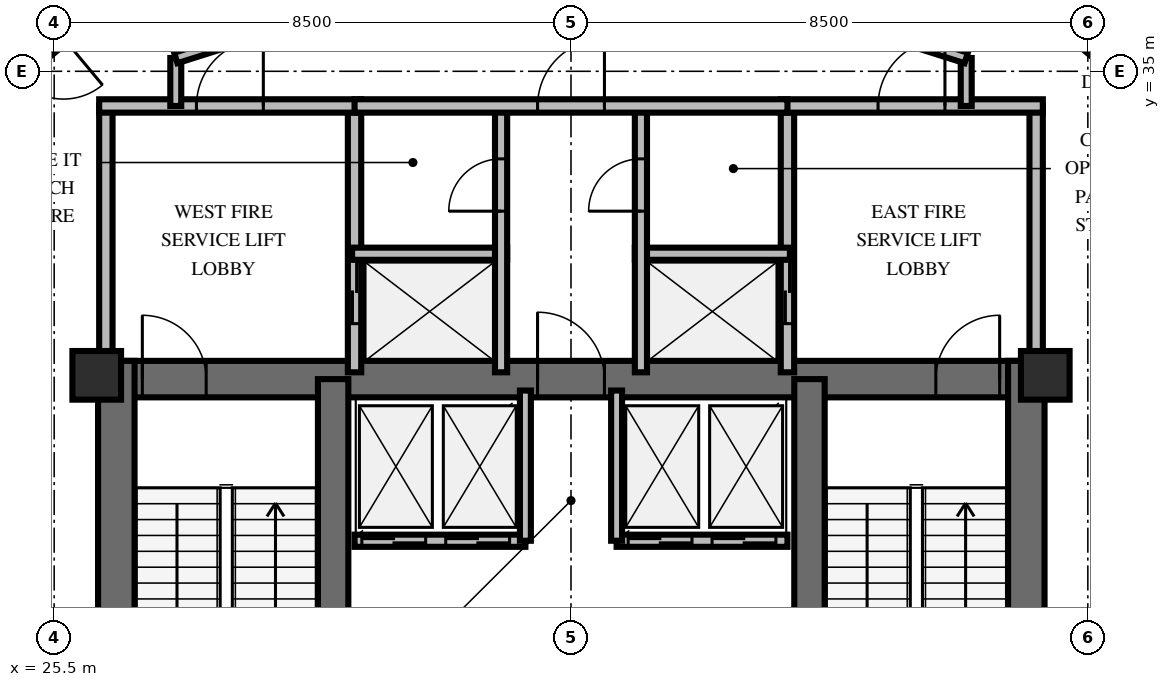
"""IFC4 building model, lengths in metres.
Left out: names, types, materials, properties, quantities, classifications, styles, units other than length and angle.
Written with IfcOpenShell. Run it as: python <this file> out.ifc"""

import sys

from ifc_helpers import new_model, si_unit, direction, frame, frame_2d, origin, origin_2d, place, context, subcontext, project, spatial, rectangle, extrude, element, fill, save


model = new_model("IFC4")
c1 = context("Model", 3, precision=1e-05, world=origin(), true_north=direction((0.0, 1.0)))
c2 = subcontext(c1, "Body", "Model", "MODEL_VIEW")
j1 = project(units=[si_unit("LENGTHUNIT", "METRE"), si_unit("PLANEANGLEUNIT", "RADIAN")], contexts=[c1])
p1 = place(None, origin())
s1 = spatial("IfcSite", under=j1, at=p1, CompositionType="ELEMENT")
p2 = place(p1, origin())
s2 = spatial("IfcBuilding", under=s1, at=p2, CompositionType="ELEMENT")
p3 = place(p2, frame((0.0, 0.0, 277.2)))
s3 = spatial("IfcBuildingStorey", under=s2, at=p3, CompositionType="ELEMENT", Elevation=277.2)
p4 = place(p3, frame((26.222, 29.938, 0.0), z_axis=(0.0, 0.0, 1.0), x_axis=(1.0, 0.0, 0.0)))
e1 = element("IfcWall", 1, at=p4, inside=s3, PredefinedType="SHEAR", context=c2, shape_type="SweptSolid", body=[
    extrude(rectangle(XDim=15.566, YDim=0.6, at=frame_2d((7.783, 0.0))), origin(), (0.0, 0.0, 1.0), 3.6),
])
p5 = place(p4, frame((0.728, 0.0, 0.0)))
e2 = element("IfcOpeningElement", 2, at=p5, cuts=e1, PredefinedType="OPENING", context=c2, shape_type="SweptSolid", body=[
    extrude(rectangle(XDim=1.05, YDim=2.15, at=frame_2d((0.525, 1.075))), frame((0.0, 0.31, 0.0), z_axis=(0.0, -1.0, 0.0), x_axis=(1.0, 0.0, 0.0)), (0.0, 0.0, 1.0), 0.62),
])
p6 = place(p4, frame((13.778, 0.0, 0.0)))
e3 = element("IfcOpeningElement", 3, at=p6, cuts=e1, PredefinedType="OPENING", context=c2, shape_type="SweptSolid", body=[
    extrude(rectangle(XDim=1.05, YDim=2.15, at=frame_2d((0.525, 1.075))), frame((0.0, 0.31, 0.0), z_axis=(0.0, -1.0, 0.0), x_axis=(1.0, 0.0, 0.0)), (0.0, 0.0, 1.0), 0.62),
])
p7 = place(p4, frame((7.228, 0.0, 0.0)))
e4 = element("IfcOpeningElement", 4, at=p7, cuts=e1, PredefinedType="OPENING", context=c2, shape_type="SweptSolid", body=[
    extrude(rectangle(XDim=1.1, YDim=2.15, at=frame_2d((0.55, 1.075))), frame((0.0, 0.31, 0.0), z_axis=(0.0, -1.0, 0.0), x_axis=(1.0, 0.0, 0.0)), (0.0, 0.0, 1.0), 0.62),
])
for number, where, z_axis, x_axis in (
    (5, (26.522, 19.962, 0.0), (0.0, 0.0, 1.0), (0.0, 1.0, 0.0)),
    (6, (41.488, 19.962, 0.0), (0.0, 0.0, 1.0), (0.0, 1.0, 0.0)),
):
    element("IfcWall", number, at=place(p3, frame(where, z_axis=z_axis, x_axis=x_axis)), inside=s3, PredefinedType="SHEAR", context=c2, shape_type="SweptSolid", body=[
        extrude(rectangle(XDim=10.276, YDim=0.6, at=frame_2d((5.138, 0.0))), origin(), (0.0, 0.0, 1.0), 3.6),
    ])
for number, where, z_axis, x_axis in (
    (7, (30.088, 20.262, 0.0), (0.0, 0.0, 1.0), (0.0, 1.0, 0.0)),
    (8, (37.922, 20.262, 0.0), (0.0, 0.0, 1.0), (0.0, 1.0, 0.0)),
):
    element("IfcWall", number, at=place(p3, frame(where, z_axis=z_axis, x_axis=x_axis)), inside=s3, PredefinedType="SHEAR", context=c2, shape_type="SweptSolid", body=[
        extrude(rectangle(XDim=9.676, YDim=0.5, at=frame_2d((4.838, 0.0))), origin(), (0.0, 0.0, 1.0), 3.6),
    ])
for number, where, z_axis, x_axis in (
    (9, (26.2, 30.0, 0.0), (0.0, 0.0, 1.0), (1.0, 0.0, 0.0)),
    (10, (41.8, 30.0, 0.0), (0.0, 0.0, 1.0), (1.0, 0.0, 0.0)),
):
    element("IfcColumn", number, at=place(p3, frame(where, z_axis=z_axis, x_axis=x_axis)), inside=s3, PredefinedType="PILASTER", context=c2, shape_type="SweptSolid", body=[
        extrude(rectangle(XDim=0.8, YDim=0.8, at=origin_2d()), origin(), (0.0, 0.0, 1.0), 3.6),
    ])
p8 = place(p3, frame((26.35, 30.05, 0.0), z_axis=(0.0, 0.0, 1.0), x_axis=(0.0, 1.0, 0.0)))
e11 = element("IfcWall", 11, at=p8, inside=s3, PredefinedType="SOLIDWALL", context=c2, shape_type="SweptSolid", body=[
    extrude(rectangle(XDim=4.38, YDim=0.22, at=frame_2d((2.19, 0.0))), origin(), (0.0, 0.0, 1.0), 2.46),
])
p9 = place(p3, frame((30.44, 30.05, 0.0), z_axis=(0.0, 0.0, 1.0), x_axis=(0.0, 1.0, 0.0)))
e12 = element("IfcWall", 12, at=p9, inside=s3, PredefinedType="SOLIDWALL", context=c2, shape_type="SweptSolid", body=[
    extrude(rectangle(XDim=4.38, YDim=0.22, at=frame_2d((2.19, 0.0))), origin(), (0.0, 0.0, 1.0), 2.46),
])
p10 = place(p9, frame((0.8, 0.0, 0.0)))
e13 = element("IfcOpeningElement", 13, at=p10, cuts=e12, PredefinedType="OPENING", context=c2, shape_type="SweptSolid", body=[
    extrude(rectangle(XDim=1.05, YDim=2.1, at=frame_2d((0.525, 1.05))), frame((0.0, 0.12, 0.0), z_axis=(0.0, -1.0, 0.0), x_axis=(1.0, 0.0, 0.0)), (0.0, 0.0, 1.0), 0.24),
])
p11 = place(p3, frame((26.24, 34.43, 0.0), z_axis=(0.0, 0.0, 1.0), x_axis=(1.0, 0.0, 0.0)))
e14 = element("IfcWall", 14, at=p11, inside=s3, PredefinedType="SOLIDWALL", context=c2, shape_type="SweptSolid", body=[
    extrude(rectangle(XDim=4.31, YDim=0.22, at=frame_2d((2.155, 0.0))), origin(), (0.0, 0.0, 1.0), 2.46),
])
p12 = place(p11, frame((1.6, 0.0, 0.0)))
e15 = element("IfcOpeningElement", 15, at=p12, cuts=e14, PredefinedType="OPENING", context=c2, shape_type="SweptSolid", body=[
    extrude(rectangle(XDim=1.1, YDim=2.15, at=frame_2d((0.55, 1.075))), frame((0.0, 0.12, 0.0), z_axis=(0.0, -1.0, 0.0), x_axis=(1.0, 0.0, 0.0)), (0.0, 0.0, 1.0), 0.24),
])
p13 = place(p3, frame((30.4, 32.0, 0.0), z_axis=(0.0, 0.0, 1.0), x_axis=(1.0, 0.0, 0.0)))
e16 = element("IfcWall", 16, at=p13, inside=s3, PredefinedType="SOLIDWALL", context=c2, shape_type="SweptSolid", body=[
    extrude(rectangle(XDim=2.55, YDim=0.2, at=frame_2d((1.275, 0.0))), origin(), (0.0, 0.0, 1.0), 2.46),
])
p14 = place(p3, frame((32.85, 30.05, 0.0), z_axis=(0.0, 0.0, 1.0), x_axis=(0.0, 1.0, 0.0)))
e17 = element("IfcWall", 17, at=p14, inside=s3, PredefinedType="SOLIDWALL", context=c2, shape_type="SweptSolid", body=[
    extrude(rectangle(XDim=4.38, YDim=0.2, at=frame_2d((2.19, 0.0))), origin(), (0.0, 0.0, 1.0), 2.46),
])
p15 = place(p14, frame((2.65, 0.0, 0.0)))
e18 = element("IfcOpeningElement", 18, at=p15, cuts=e17, PredefinedType="OPENING", context=c2, shape_type="SweptSolid", body=[
    extrude(rectangle(XDim=0.86, YDim=2.05, at=frame_2d((0.43, 1.025))), frame((0.0, 0.11, 0.0), z_axis=(0.0, -1.0, 0.0), x_axis=(1.0, 0.0, 0.0)), (0.0, 0.0, 1.0), 0.22),
])
p16 = place(p3, frame((37.56, 30.05, 0.0), z_axis=(0.0, 0.0, 1.0), x_axis=(0.0, 1.0, 0.0)))
e19 = element("IfcWall", 19, at=p16, inside=s3, PredefinedType="SOLIDWALL", context=c2, shape_type="SweptSolid", body=[
    extrude(rectangle(XDim=4.38, YDim=0.22, at=frame_2d((2.19, 0.0))), origin(), (0.0, 0.0, 1.0), 2.46),
])
p17 = place(p16, frame((0.8, 0.0, 0.0)))
e20 = element("IfcOpeningElement", 20, at=p17, cuts=e19, PredefinedType="OPENING", context=c2, shape_type="SweptSolid", body=[
    extrude(rectangle(XDim=1.05, YDim=2.1, at=frame_2d((0.525, 1.05))), frame((0.0, 0.12, 0.0), z_axis=(0.0, -1.0, 0.0), x_axis=(1.0, 0.0, 0.0)), (0.0, 0.0, 1.0), 0.24),
])
p18 = place(p3, frame((41.65, 30.05, 0.0), z_axis=(0.0, 0.0, 1.0), x_axis=(0.0, 1.0, 0.0)))
e21 = element("IfcWall", 21, at=p18, inside=s3, PredefinedType="SOLIDWALL", context=c2, shape_type="SweptSolid", body=[
    extrude(rectangle(XDim=4.38, YDim=0.22, at=frame_2d((2.19, 0.0))), origin(), (0.0, 0.0, 1.0), 2.46),
])
p19 = place(p3, frame((37.45, 34.43, 0.0), z_axis=(0.0, 0.0, 1.0), x_axis=(1.0, 0.0, 0.0)))
e22 = element("IfcWall", 22, at=p19, inside=s3, PredefinedType="SOLIDWALL", context=c2, shape_type="SweptSolid", body=[
    extrude(rectangle(XDim=4.31, YDim=0.22, at=frame_2d((2.155, 0.0))), origin(), (0.0, 0.0, 1.0), 2.46),
])
p20 = place(p19, frame((1.6, 0.0, 0.0)))
e23 = element("IfcOpeningElement", 23, at=p20, cuts=e22, PredefinedType="OPENING", context=c2, shape_type="SweptSolid", body=[
    extrude(rectangle(XDim=1.1, YDim=2.15, at=frame_2d((0.55, 1.075))), frame((0.0, 0.12, 0.0), z_axis=(0.0, -1.0, 0.0), x_axis=(1.0, 0.0, 0.0)), (0.0, 0.0, 1.0), 0.24),
])
p21 = place(p3, frame((35.05, 32.0, 0.0), z_axis=(0.0, 0.0, 1.0), x_axis=(1.0, 0.0, 0.0)))
e24 = element("IfcWall", 24, at=p21, inside=s3, PredefinedType="SOLIDWALL", context=c2, shape_type="SweptSolid", body=[
    extrude(rectangle(XDim=2.55, YDim=0.2, at=frame_2d((1.275, 0.0))), origin(), (0.0, 0.0, 1.0), 2.46),
])
p22 = place(p3, frame((35.15, 30.05, 0.0), z_axis=(0.0, 0.0, 1.0), x_axis=(0.0, 1.0, 0.0)))
e25 = element("IfcWall", 25, at=p22, inside=s3, PredefinedType="SOLIDWALL", context=c2, shape_type="SweptSolid", body=[
    extrude(rectangle(XDim=4.38, YDim=0.2, at=frame_2d((2.19, 0.0))), origin(), (0.0, 0.0, 1.0), 2.46),
])
p23 = place(p22, frame((2.65, 0.0, 0.0)))
e26 = element("IfcOpeningElement", 26, at=p23, cuts=e25, PredefinedType="OPENING", context=c2, shape_type="SweptSolid", body=[
    extrude(rectangle(XDim=0.86, YDim=2.05, at=frame_2d((0.43, 1.025))), frame((0.0, 0.11, 0.0), z_axis=(0.0, -1.0, 0.0), x_axis=(1.0, 0.0, 0.0)), (0.0, 0.0, 1.0), 0.22),
])
p24 = place(p3, frame((30.44, 34.43, 0.0), z_axis=(0.0, 0.0, 1.0), x_axis=(1.0, 0.0, 0.0)))
e27 = element("IfcWall", 27, at=p24, inside=s3, PredefinedType="SOLIDWALL", context=c2, shape_type="SweptSolid", body=[
    extrude(rectangle(XDim=7.12, YDim=0.22, at=frame_2d((3.56, 0.0))), origin(), (0.0, 0.0, 1.0), 2.46),
])
p25 = place(p24, frame((3.01, 0.0, 0.0)))
e28 = element("IfcOpeningElement", 28, at=p25, cuts=e27, PredefinedType="OPENING", context=c2, shape_type="SweptSolid", body=[
    extrude(rectangle(XDim=1.1, YDim=2.15, at=frame_2d((0.55, 1.075))), frame((0.0, 0.12, 0.0), z_axis=(0.0, -1.0, 0.0), x_axis=(1.0, 0.0, 0.0)), (0.0, 0.0, 1.0), 0.24),
])
p26 = place(p3, frame((30.44, 27.28, 0.0), z_axis=(0.0, 0.0, 1.0), x_axis=(1.0, 0.0, 0.0)))
e29 = element("IfcWall", 29, at=p26, inside=s3, PredefinedType="SOLIDWALL", context=c2, shape_type="SweptSolid", body=[
    extrude(rectangle(XDim=2.81, YDim=0.2, at=frame_2d((1.405, 0.0))), origin(), (0.0, 0.0, 1.0), 2.46),
])
p27 = place(p26, frame((0.12, 0.0, 0.0)))
e30 = element("IfcOpeningElement", 30, at=p27, cuts=e29, PredefinedType="OPENING", context=c2, shape_type="SweptSolid", body=[
    extrude(rectangle(XDim=1.05, YDim=2.1, at=frame_2d((0.525, 1.05))), frame((0.0, 0.11, 0.0), z_axis=(0.0, -1.0, 0.0), x_axis=(1.0, 0.0, 0.0)), (0.0, 0.0, 1.0), 0.22),
])
p28 = place(p26, frame((1.5, 0.0, 0.0)))
e31 = element("IfcOpeningElement", 31, at=p28, cuts=e29, PredefinedType="OPENING", context=c2, shape_type="SweptSolid", body=[
    extrude(rectangle(XDim=1.05, YDim=2.1, at=frame_2d((0.525, 1.05))), frame((0.0, 0.11, 0.0), z_axis=(0.0, -1.0, 0.0), x_axis=(1.0, 0.0, 0.0)), (0.0, 0.0, 1.0), 0.22),
])
p29 = place(p3, frame((33.25, 27.28, 0.0), z_axis=(0.0, 0.0, 1.0), x_axis=(0.0, 1.0, 0.0)))
e32 = element("IfcWall", 32, at=p29, inside=s3, PredefinedType="SOLIDWALL", context=c2, shape_type="SweptSolid", body=[
    extrude(rectangle(XDim=2.47, YDim=0.18, at=frame_2d((1.235, 0.0))), origin(), (0.0, 0.0, 1.0), 2.46),
])
p30 = place(p3, frame((34.75, 27.28, 0.0), z_axis=(0.0, 0.0, 1.0), x_axis=(1.0, 0.0, 0.0)))
e33 = element("IfcWall", 33, at=p30, inside=s3, PredefinedType="SOLIDWALL", context=c2, shape_type="SweptSolid", body=[
    extrude(rectangle(XDim=2.81, YDim=0.2, at=frame_2d((1.405, 0.0))), origin(), (0.0, 0.0, 1.0), 2.46),
])
p31 = place(p30, frame((0.19, 0.0, 0.0)))
e34 = element("IfcOpeningElement", 34, at=p31, cuts=e33, PredefinedType="OPENING", context=c2, shape_type="SweptSolid", body=[
    extrude(rectangle(XDim=1.05, YDim=2.1, at=frame_2d((0.525, 1.05))), frame((0.0, 0.11, 0.0), z_axis=(0.0, -1.0, 0.0), x_axis=(1.0, 0.0, 0.0)), (0.0, 0.0, 1.0), 0.22),
])
p32 = place(p30, frame((1.57, 0.0, 0.0)))
e35 = element("IfcOpeningElement", 35, at=p32, cuts=e33, PredefinedType="OPENING", context=c2, shape_type="SweptSolid", body=[
    extrude(rectangle(XDim=1.05, YDim=2.1, at=frame_2d((0.525, 1.05))), frame((0.0, 0.11, 0.0), z_axis=(0.0, -1.0, 0.0), x_axis=(1.0, 0.0, 0.0)), (0.0, 0.0, 1.0), 0.22),
])
p33 = place(p3, frame((34.75, 27.28, 0.0), z_axis=(0.0, 0.0, 1.0), x_axis=(0.0, 1.0, 0.0)))
e36 = element("IfcWall", 36, at=p33, inside=s3, PredefinedType="SOLIDWALL", context=c2, shape_type="SweptSolid", body=[
    extrude(rectangle(XDim=2.47, YDim=0.18, at=frame_2d((1.235, 0.0))), origin(), (0.0, 0.0, 1.0), 2.46),
])
for number, where, z_axis, x_axis in (
    (37, (27.5, 34.43, 0.0), (0.0, 0.0, 1.0), (0.0, 1.0, 0.0)),
    (38, (40.5, 35.219, 0.0), (0.0, 0.0, 1.0), (0.0, -1.0, 0.0)),
):
    element("IfcWall", number, at=place(p3, frame(where, z_axis=z_axis, x_axis=x_axis)), inside=s3, PredefinedType="PARTITIONING", context=c2, shape_type="SweptSolid", body=[
        extrude(rectangle(XDim=0.789, YDim=0.18, at=frame_2d((0.395, 0.0))), origin(), (0.0, 0.0, 1.0), 2.46),
    ])
p34 = place(p3, frame((27.5, 35.219, 0.0), z_axis=(0.0, 0.0, 1.0), x_axis=(0.953228121756, 0.302251795518, 0.0)))
e39 = element("IfcWall", 39, at=p34, inside=s3, PredefinedType="PARTITIONING", context=c2, shape_type="SweptSolid", body=[
    extrude(rectangle(XDim=6.819, YDim=0.18, at=frame_2d((3.409, 0.0))), origin(), (0.0, 0.0, 1.0), 2.46),
])
p35 = place(p34, frame((2.86, 0.0, 0.0)))
e40 = element("IfcOpeningElement", 40, at=p35, cuts=e39, PredefinedType="OPENING", context=c2, shape_type="SweptSolid", body=[
    extrude(rectangle(XDim=1.1, YDim=2.15, at=frame_2d((0.55, 1.075))), frame((0.0, 0.1, 0.0), z_axis=(0.0, -1.0, 0.0), x_axis=(1.0, 0.0, 0.0)), (0.0, 0.0, 1.0), 0.2),
])
p36 = place(p3, frame((34.0, 37.28, 0.0), z_axis=(0.0, 0.0, 1.0), x_axis=(0.953228121756, -0.302251795518, 0.0)))
e41 = element("IfcWall", 41, at=p36, inside=s3, PredefinedType="PARTITIONING", context=c2, shape_type="SweptSolid", body=[
    extrude(rectangle(XDim=6.819, YDim=0.18, at=frame_2d((3.409, 0.0))), origin(), (0.0, 0.0, 1.0), 2.46),
])
p37 = place(p36, frame((2.86, 0.0, 0.0)))
e42 = element("IfcOpeningElement", 42, at=p37, cuts=e41, PredefinedType="OPENING", context=c2, shape_type="SweptSolid", body=[
    extrude(rectangle(XDim=1.1, YDim=2.15, at=frame_2d((0.55, 1.075))), frame((0.0, 0.1, 0.0), z_axis=(0.0, -1.0, 0.0), x_axis=(1.0, 0.0, 0.0)), (0.0, 0.0, 1.0), 0.2),
])
p38 = place(p3, frame((43.881, 34.247, 0.0), z_axis=(0.0, 0.0, 1.0), x_axis=(-0.764357098744, 0.644793164976, 0.0)))
e43 = element("IfcWall", 43, at=p38, inside=s3, PredefinedType="PARTITIONING", context=c2, shape_type="SweptSolid", body=[
    extrude(rectangle(XDim=4.47, YDim=0.18, at=frame_2d((2.235, 0.0))), origin(), (0.0, 0.0, 1.0), 2.46),
])
p39 = place(p3, frame((45.186, 35.336, 0.0), z_axis=(0.0, 0.0, 1.0), x_axis=(-0.764355389284, 0.644795191415, 0.0)))
e44 = element("IfcWall", 44, at=p39, inside=s3, PredefinedType="PARTITIONING", context=c2, shape_type="SweptSolid", body=[
    extrude(rectangle(XDim=5.06, YDim=0.15, at=frame_2d((2.53, 0.0))), origin(), (0.0, 0.0, 1.0), 2.46),
])
p40 = place(p39, frame((1.117, 0.0, 0.0)))
e45 = element("IfcOpeningElement", 45, at=p40, cuts=e44, PredefinedType="OPENING", context=c2, shape_type="SweptSolid", body=[
    extrude(rectangle(XDim=0.95, YDim=2.15, at=frame_2d((0.475, 1.075))), frame((0.0, 0.085, 0.0), z_axis=(0.0, -1.0, 0.0), x_axis=(1.0, 0.0, 0.0)), (0.0, 0.0, 1.0), 0.17),
])
p41 = place(p3, frame((27.594, 37.163, 0.0), z_axis=(0.0, 0.0, 1.0), x_axis=(-0.767746496496, -0.640753710187, 0.0)))
e46 = element("IfcWall", 46, at=p41, inside=s3, PredefinedType="PARTITIONING", context=c2, shape_type="SweptSolid", body=[
    extrude(rectangle(XDim=4.47, YDim=0.18, at=frame_2d((2.235, 0.0))), origin(), (0.0, 0.0, 1.0), 2.46),
])
p42 = place(p41, frame((2.527, 0.0, 0.0)))
e47 = element("IfcOpeningElement", 47, at=p42, cuts=e46, PredefinedType="OPENING", context=c2, shape_type="SweptSolid", body=[
    extrude(rectangle(XDim=1.0, YDim=2.15, at=frame_2d((0.5, 1.075))), frame((0.0, 0.1, 0.0), z_axis=(0.0, -1.0, 0.0), x_axis=(1.0, 0.0, 0.0)), (0.0, 0.0, 1.0), 0.2),
])
p43 = place(p5, origin())
e48 = element("IfcDoor", 48, at=p43, inside=s3, OperationType="SINGLE_SWING_LEFT", PredefinedType="DOOR", context=c2, shape_type="SweptSolid", body=[
    extrude(rectangle(XDim=1.05, YDim=2.15, at=frame_2d((0.525, 1.075))), frame((0.0, 0.025, 0.0), z_axis=(0.0, -1.0, 0.0), x_axis=(1.0, 0.0, 0.0)), (0.0, 0.0, 1.0), 0.05),
])
fill(e2, e48)
p44 = place(p6, origin())
e49 = element("IfcDoor", 49, at=p44, inside=s3, OperationType="SINGLE_SWING_RIGHT", PredefinedType="DOOR", context=c2, shape_type="SweptSolid", body=[
    extrude(rectangle(XDim=1.05, YDim=2.15, at=frame_2d((0.525, 1.075))), frame((0.0, 0.025, 0.0), z_axis=(0.0, -1.0, 0.0), x_axis=(1.0, 0.0, 0.0)), (0.0, 0.0, 1.0), 0.05),
])
fill(e3, e49)
p45 = place(p7, origin())
e50 = element("IfcDoor", 50, at=p45, inside=s3, OperationType="SINGLE_SWING_LEFT", PredefinedType="DOOR", context=c2, shape_type="SweptSolid", body=[
    extrude(rectangle(XDim=1.1, YDim=2.15, at=frame_2d((0.55, 1.075))), frame((0.0, 0.025, 0.0), z_axis=(0.0, -1.0, 0.0), x_axis=(1.0, 0.0, 0.0)), (0.0, 0.0, 1.0), 0.05),
])
fill(e4, e50)
p46 = place(p12, origin())
e51 = element("IfcDoor", 51, at=p46, inside=s3, OperationType="SINGLE_SWING_RIGHT", PredefinedType="DOOR", context=c2, shape_type="SweptSolid", body=[
    extrude(rectangle(XDim=1.1, YDim=2.15, at=frame_2d((0.55, 1.075))), frame((0.0, 0.025, 0.0), z_axis=(0.0, -1.0, 0.0), x_axis=(1.0, 0.0, 0.0)), (0.0, 0.0, 1.0), 0.05),
])
fill(e15, e51)
p47 = place(p10, origin())
e52 = element("IfcDoor", 52, at=p47, inside=s3, OperationType="DOUBLE_DOOR_SLIDING", PredefinedType="USERDEFINED", context=c2, shape_type="SweptSolid", body=[
    extrude(rectangle(XDim=1.05, YDim=2.1, at=frame_2d((0.525, 1.05))), frame((0.0, 0.025, 0.0), z_axis=(0.0, -1.0, 0.0), x_axis=(1.0, 0.0, 0.0)), (0.0, 0.0, 1.0), 0.05),
])
fill(e13, e52)
p48 = place(p15, origin())
e53 = element("IfcDoor", 53, at=p48, inside=s3, OperationType="SINGLE_SWING_LEFT", PredefinedType="TRAPDOOR", context=c2, shape_type="SweptSolid", body=[
    extrude(rectangle(XDim=0.86, YDim=2.05, at=frame_2d((0.43, 1.025))), frame((0.0, 0.025, 0.0), z_axis=(0.0, -1.0, 0.0), x_axis=(1.0, 0.0, 0.0)), (0.0, 0.0, 1.0), 0.05),
])
fill(e18, e53)
p49 = place(p20, origin())
e54 = element("IfcDoor", 54, at=p49, inside=s3, OperationType="SINGLE_SWING_RIGHT", PredefinedType="DOOR", context=c2, shape_type="SweptSolid", body=[
    extrude(rectangle(XDim=1.1, YDim=2.15, at=frame_2d((0.55, 1.075))), frame((0.0, 0.025, 0.0), z_axis=(0.0, -1.0, 0.0), x_axis=(1.0, 0.0, 0.0)), (0.0, 0.0, 1.0), 0.05),
])
fill(e23, e54)
p50 = place(p17, origin())
e55 = element("IfcDoor", 55, at=p50, inside=s3, OperationType="DOUBLE_DOOR_SLIDING", PredefinedType="USERDEFINED", context=c2, shape_type="SweptSolid", body=[
    extrude(rectangle(XDim=1.05, YDim=2.1, at=frame_2d((0.525, 1.05))), frame((0.0, 0.025, 0.0), z_axis=(0.0, -1.0, 0.0), x_axis=(1.0, 0.0, 0.0)), (0.0, 0.0, 1.0), 0.05),
])
fill(e20, e55)
p51 = place(p23, origin())
e56 = element("IfcDoor", 56, at=p51, inside=s3, OperationType="SINGLE_SWING_LEFT", PredefinedType="TRAPDOOR", context=c2, shape_type="SweptSolid", body=[
    extrude(rectangle(XDim=0.86, YDim=2.05, at=frame_2d((0.43, 1.025))), frame((0.0, 0.025, 0.0), z_axis=(0.0, -1.0, 0.0), x_axis=(1.0, 0.0, 0.0)), (0.0, 0.0, 1.0), 0.05),
])
fill(e26, e56)
p52 = place(p25, origin())
e57 = element("IfcDoor", 57, at=p52, inside=s3, OperationType="SINGLE_SWING_RIGHT", PredefinedType="DOOR", context=c2, shape_type="SweptSolid", body=[
    extrude(rectangle(XDim=1.1, YDim=2.15, at=frame_2d((0.55, 1.075))), frame((0.0, 0.025, 0.0), z_axis=(0.0, -1.0, 0.0), x_axis=(1.0, 0.0, 0.0)), (0.0, 0.0, 1.0), 0.05),
])
fill(e28, e57)
p53 = place(p27, origin())
e58 = element("IfcDoor", 58, at=p53, inside=s3, OperationType="DOUBLE_DOOR_SLIDING", PredefinedType="USERDEFINED", context=c2, shape_type="SweptSolid", body=[
    extrude(rectangle(XDim=1.05, YDim=2.1, at=frame_2d((0.525, 1.05))), frame((0.0, 0.025, 0.0), z_axis=(0.0, -1.0, 0.0), x_axis=(1.0, 0.0, 0.0)), (0.0, 0.0, 1.0), 0.05),
])
fill(e30, e58)
p54 = place(p28, origin())
e59 = element("IfcDoor", 59, at=p54, inside=s3, OperationType="DOUBLE_DOOR_SLIDING", PredefinedType="USERDEFINED", context=c2, shape_type="SweptSolid", body=[
    extrude(rectangle(XDim=1.05, YDim=2.1, at=frame_2d((0.525, 1.05))), frame((0.0, 0.025, 0.0), z_axis=(0.0, -1.0, 0.0), x_axis=(1.0, 0.0, 0.0)), (0.0, 0.0, 1.0), 0.05),
])
fill(e31, e59)
p55 = place(p31, origin())
e60 = element("IfcDoor", 60, at=p55, inside=s3, OperationType="DOUBLE_DOOR_SLIDING", PredefinedType="USERDEFINED", context=c2, shape_type="SweptSolid", body=[
    extrude(rectangle(XDim=1.05, YDim=2.1, at=frame_2d((0.525, 1.05))), frame((0.0, 0.025, 0.0), z_axis=(0.0, -1.0, 0.0), x_axis=(1.0, 0.0, 0.0)), (0.0, 0.0, 1.0), 0.05),
])
fill(e34, e60)
p56 = place(p32, origin())
e61 = element("IfcDoor", 61, at=p56, inside=s3, OperationType="DOUBLE_DOOR_SLIDING", PredefinedType="USERDEFINED", context=c2, shape_type="SweptSolid", body=[
    extrude(rectangle(XDim=1.05, YDim=2.1, at=frame_2d((0.525, 1.05))), frame((0.0, 0.025, 0.0), z_axis=(0.0, -1.0, 0.0), x_axis=(1.0, 0.0, 0.0)), (0.0, 0.0, 1.0), 0.05),
])
fill(e35, e61)
p57 = place(p42, origin())
e62 = element("IfcDoor", 62, at=p57, inside=s3, OperationType="SINGLE_SWING_LEFT", PredefinedType="DOOR", context=c2, shape_type="SweptSolid", body=[
    extrude(rectangle(XDim=1.0, YDim=2.15, at=frame_2d((0.5, 1.075))), frame((0.0, 0.025, 0.0), z_axis=(0.0, -1.0, 0.0), x_axis=(1.0, 0.0, 0.0)), (0.0, 0.0, 1.0), 0.05),
])
fill(e47, e62)
save(model, sys.argv[1])
